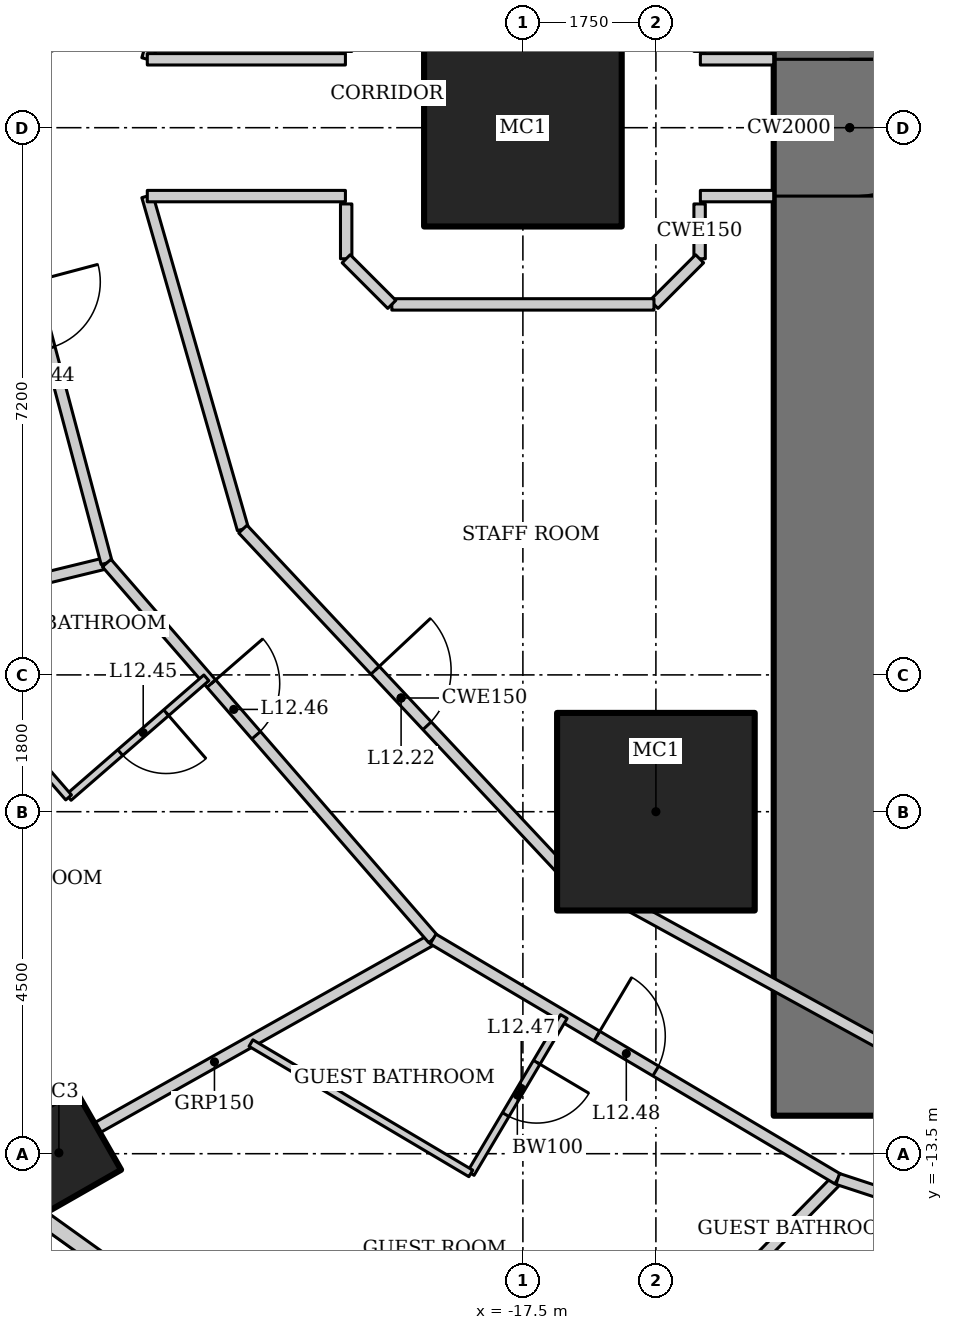
"""IFC4 building model, lengths in metres.
Left out: names, types, materials, properties, quantities, classifications, styles, units other than length and angle.
Written with IfcOpenShell. Run it as: python <this file> out.ifc"""

import sys

from ifc_helpers import new_model, si_unit, direction, frame, frame_2d, origin, origin_2d, place, context, subcontext, project, spatial, rectangle, hollow_rectangle, extrude, element, fill, save


model = new_model("IFC4")
c1 = context("Model", 3, precision=1e-05, world=origin(), true_north=direction((0.0, 1.0)))
c2 = subcontext(c1, "Body", "Model", "MODEL_VIEW")
j1 = project(units=[si_unit("LENGTHUNIT", "METRE"), si_unit("PLANEANGLEUNIT", "RADIAN")], contexts=[c1])
p1 = place(None, origin())
s1 = spatial("IfcSite", under=j1, at=p1, CompositionType="ELEMENT")
p2 = place(p1, origin())
s2 = spatial("IfcBuilding", under=s1, at=p2, CompositionType="ELEMENT")
p3 = place(p2, frame((0.0, 0.0, 58.6)))
s3 = spatial("IfcBuildingStorey", under=s2, at=p3, CompositionType="ELEMENT", Elevation=58.6)
for number, where, z_axis, x_axis in (
    (1, (-17.5, 0.0, 0.0), (0.0, 0.0, 1.0), (1.0, 0.0, 0.0)),
    (2, (-15.75, -9.0, 0.0), (0.0, 0.0, 1.0), (1.0, 0.0, 0.0)),
):
    element("IfcColumn", number, at=place(p3, frame(where, z_axis=z_axis, x_axis=x_axis)), inside=s3, PredefinedType="COLUMN", context=c2, shape_type="SweptSolid", body=[
        extrude(hollow_rectangle(XDim=2.6, YDim=2.6, WallThickness=0.13, at=origin_2d()), origin(), (0.0, 0.0, 1.0), 3.6),
    ])
p4 = place(p3, frame((-23.605, -13.489, 0.0), z_axis=(0.0, 0.0, 1.0), x_axis=(0.86824298017, 0.496139221777, 0.0)))
e3 = element("IfcColumn", 3, at=p4, inside=s3, PredefinedType="COLUMN", context=c2, shape_type="SweptSolid", body=[
    extrude(hollow_rectangle(XDim=1.2, YDim=1.2, WallThickness=0.12, at=origin_2d()), origin(), (0.0, 0.0, 1.0), 3.6),
])
p5 = place(p3, frame((-13.2, 13.0, 0.0), z_axis=(0.0, 0.0, 1.0), x_axis=(0.0, -1.0, 0.0)))
e4 = element("IfcWall", 4, at=p5, inside=s3, PredefinedType="SHEAR", context=c2, shape_type="SweptSolid", body=[
    extrude(rectangle(XDim=26.0, YDim=2.0, at=frame_2d((13.0, 0.0))), origin(), (0.0, 0.0, 1.0), 3.6),
])
p6 = place(p5, frame((12.1, 0.0, 0.0)))
e5 = element("IfcOpeningElement", 5, at=p6, cuts=e4, PredefinedType="OPENING", context=c2, shape_type="SweptSolid", body=[
    extrude(rectangle(XDim=1.8, YDim=2.1, at=frame_2d((0.9, 1.05))), frame((0.0, 1.01, 0.0), z_axis=(0.0, -1.0, 0.0), x_axis=(1.0, 0.0, 0.0)), (0.0, 0.0, 1.0), 2.02),
])
p7 = place(p3, frame((-24.482, -13.875, 0.0), z_axis=(0.0, 0.0, 1.0), x_axis=(0.812791321576, -0.582554948112, 0.0)))
e6 = element("IfcWall", 6, at=p7, inside=s3, PredefinedType="SOLIDWALL", context=c2, shape_type="SweptSolid", body=[
    extrude(rectangle(XDim=8.063, YDim=0.2, at=frame_2d((4.032, 0.0))), origin(), (0.0, 0.0, 1.0), 3.45),
])
p8 = place(p7, frame((2.832, 0.0, 0.5)))
e7 = element("IfcOpeningElement", 7, at=p8, cuts=e6, PredefinedType="OPENING", context=c2, shape_type="SweptSolid", body=[
    extrude(rectangle(XDim=2.4, YDim=2.2, at=frame_2d((1.2, 1.1))), frame((0.0, 0.11, 0.0), z_axis=(0.0, -1.0, 0.0), x_axis=(1.0, 0.0, 0.0)), (0.0, 0.0, 1.0), 0.22),
])
p9 = place(p3, frame((-29.222, -7.254, 0.0), z_axis=(0.0, 0.0, 1.0), x_axis=(0.971456980633, 0.237215797913, 0.0)))
e8 = element("IfcWall", 8, at=p9, inside=s3, PredefinedType="PARTITIONING", context=c2, shape_type="SweptSolid", body=[
    extrude(rectangle(XDim=6.429, YDim=0.15, at=frame_2d((3.215, 0.0))), origin(), (0.0, 0.0, 1.0), 2.332),
])
p10 = place(p3, frame((-24.435, -13.909, 0.0), z_axis=(0.0, 0.0, 1.0), x_axis=(0.871747379892, 0.489955616001, 0.0)))
e9 = element("IfcWall", 9, at=p10, inside=s3, PredefinedType="PARTITIONING", context=c2, shape_type="SweptSolid", body=[
    extrude(rectangle(XDim=6.6, YDim=0.15, at=frame_2d((3.3, 0.0))), origin(), (0.0, 0.0, 1.0), 2.693),
])
p11 = place(p3, frame((-17.97, -18.542, 0.0), z_axis=(0.0, 0.0, 1.0), x_axis=(0.699736251994, 0.714401272147, 0.0)))
e10 = element("IfcWall", 10, at=p11, inside=s3, PredefinedType="PARTITIONING", context=c2, shape_type="SweptSolid", body=[
    extrude(rectangle(XDim=6.593, YDim=0.15, at=frame_2d((3.296, 0.0))), origin(), (0.0, 0.0, 1.0), 2.528),
])
p12 = place(p3, frame((-22.976, 5.729, 0.0), z_axis=(0.0, 0.0, 1.0), x_axis=(-0.257083265334, -0.966389256296, 0.0)))
e11 = element("IfcWall", 11, at=p12, inside=s3, PredefinedType="PARTITIONING", context=c2, shape_type="SweptSolid", body=[
    extrude(rectangle(XDim=5.928, YDim=0.15, at=frame_2d((2.964, 0.0))), origin(), (0.0, 0.0, 1.0), 3.45),
])
p13 = place(p12, frame((4.023, 0.0, 0.0)))
e12 = element("IfcOpeningElement", 12, at=p13, cuts=e11, PredefinedType="OPENING", context=c2, shape_type="SweptSolid", body=[
    extrude(rectangle(XDim=0.9, YDim=2.1, at=frame_2d((0.45, 1.05))), frame((0.0, 0.085, 0.0), z_axis=(0.0, -1.0, 0.0), x_axis=(1.0, 0.0, 0.0)), (0.0, 0.0, 1.0), 0.17),
])
p14 = place(p3, frame((-24.5, 0.0, 0.0), z_axis=(0.0, 0.0, 1.0), x_axis=(0.257083265334, -0.966389256296, 0.0)))
e13 = element("IfcWall", 13, at=p14, inside=s3, PredefinedType="PARTITIONING", context=c2, shape_type="SweptSolid", body=[
    extrude(rectangle(XDim=5.928, YDim=0.15, at=frame_2d((2.964, 0.0))), origin(), (0.0, 0.0, 1.0), 3.45),
])
p15 = place(p14, frame((2.1, 0.0, 0.0)))
e14 = element("IfcOpeningElement", 14, at=p15, cuts=e13, PredefinedType="OPENING", context=c2, shape_type="SweptSolid", body=[
    extrude(rectangle(XDim=0.9, YDim=2.1, at=frame_2d((0.45, 1.05))), frame((0.0, 0.085, 0.0), z_axis=(0.0, -1.0, 0.0), x_axis=(1.0, 0.0, 0.0)), (0.0, 0.0, 1.0), 0.17),
])
p16 = place(p3, frame((-22.976, -5.729, 0.0), z_axis=(0.0, 0.0, 1.0), x_axis=(0.655599989166, -0.755108372491, 0.0)))
e15 = element("IfcWall", 15, at=p16, inside=s3, PredefinedType="PARTITIONING", context=c2, shape_type="SweptSolid", body=[
    extrude(rectangle(XDim=6.551, YDim=0.15, at=frame_2d((3.275, 0.0))), origin(), (0.0, 0.0, 1.0), 3.45),
])
p17 = place(p16, frame((2.1, 0.0, 0.0)))
e16 = element("IfcOpeningElement", 16, at=p17, cuts=e15, PredefinedType="OPENING", context=c2, shape_type="SweptSolid", body=[
    extrude(rectangle(XDim=0.9, YDim=2.1, at=frame_2d((0.45, 1.05))), frame((0.0, 0.085, 0.0), z_axis=(0.0, -1.0, 0.0), x_axis=(1.0, 0.0, 0.0)), (0.0, 0.0, 1.0), 0.17),
])
p18 = place(p3, frame((-18.681, -10.675, 0.0), z_axis=(0.0, 0.0, 1.0), x_axis=(0.860147339762, -0.510045639036, 0.0)))
e17 = element("IfcWall", 17, at=p18, inside=s3, PredefinedType="PARTITIONING", context=c2, shape_type="SweptSolid", body=[
    extrude(rectangle(XDim=6.19, YDim=0.15, at=frame_2d((3.095, 0.0))), origin(), (0.0, 0.0, 1.0), 3.45),
])
p19 = place(p18, frame((2.505, 0.0, 0.0)))
e18 = element("IfcOpeningElement", 18, at=p19, cuts=e17, PredefinedType="OPENING", context=c2, shape_type="SweptSolid", body=[
    extrude(rectangle(XDim=0.9, YDim=2.1, at=frame_2d((0.45, 1.05))), frame((0.0, 0.085, 0.0), z_axis=(0.0, -1.0, 0.0), x_axis=(1.0, 0.0, 0.0)), (0.0, 0.0, 1.0), 0.17),
])
p20 = place(p3, frame((-13.357, -13.832, 0.0), z_axis=(0.0, 0.0, 1.0), x_axis=(0.950106803111, -0.311924770869, 0.0)))
e19 = element("IfcWall", 19, at=p20, inside=s3, PredefinedType="PARTITIONING", context=c2, shape_type="SweptSolid", body=[
    extrude(rectangle(XDim=5.689, YDim=0.15, at=frame_2d((2.845, 0.0))), origin(), (0.0, 0.0, 1.0), 3.45),
])
p21 = place(p20, frame((4.639, 0.0, 0.0)))
e20 = element("IfcOpeningElement", 20, at=p21, cuts=e19, PredefinedType="OPENING", context=c2, shape_type="SweptSolid", body=[
    extrude(rectangle(XDim=0.9, YDim=2.1, at=frame_2d((0.45, 1.05))), frame((0.0, 0.085, 0.0), z_axis=(0.0, -1.0, 0.0), x_axis=(1.0, 0.0, 0.0)), (0.0, 0.0, 1.0), 0.17),
])
for number, where, z_axis, x_axis in (
    (21, (-21.184, 5.282, 0.0), (0.0, 0.0, 1.0), (-0.276, -0.961, 0.0)),
    (22, (-22.442, -0.9, 0.0), (0.0, 0.0, 1.0), (0.276, -0.961, 0.0)),
):
    element("IfcWall", number, at=place(p3, frame(where, z_axis=z_axis, x_axis=x_axis)), inside=s3, PredefinedType="PARTITIONING", context=c2, shape_type="SweptSolid", body=[
        extrude(rectangle(XDim=4.559, YDim=0.15, at=frame_2d((2.279, 0.0))), origin(), (0.0, 0.0, 1.0), 3.45),
    ])
p22 = place(p3, frame((-21.184, -5.282, 0.0), z_axis=(0.0, 0.0, 1.0), x_axis=(0.68365836236, -0.729802194828, 0.0)))
e23 = element("IfcWall", 23, at=p22, inside=s3, PredefinedType="PARTITIONING", context=c2, shape_type="SweptSolid", body=[
    extrude(rectangle(XDim=6.09, YDim=0.15, at=frame_2d((3.045, 0.0))), origin(), (0.0, 0.0, 1.0), 3.45),
])
p23 = place(p22, frame((2.545, 0.0, 0.0)))
e24 = element("IfcOpeningElement", 24, at=p23, cuts=e23, PredefinedType="OPENING", context=c2, shape_type="SweptSolid", body=[
    extrude(rectangle(XDim=1.0, YDim=2.1, at=frame_2d((0.5, 1.05))), frame((0.0, 0.085, 0.0), z_axis=(0.0, -1.0, 0.0), x_axis=(1.0, 0.0, 0.0)), (0.0, 0.0, 1.0), 0.17),
])
p24 = place(p3, frame((-17.021, -9.726, 0.0), z_axis=(0.0, 0.0, 1.0), x_axis=(0.876522084062, -0.481361647986, 0.0)))
e25 = element("IfcWall", 25, at=p24, inside=s3, PredefinedType="PARTITIONING", context=c2, shape_type="SweptSolid", body=[
    extrude(rectangle(XDim=5.687, YDim=0.15, at=frame_2d((2.844, 0.0))), origin(), (0.0, 0.0, 1.0), 3.45),
])
p25 = place(p3, frame((-21.665, -7.239, 0.0), z_axis=(0.0, 0.0, 1.0), x_axis=(-0.755098052661, -0.655611875172, 0.0)))
e26 = element("IfcWall", 26, at=p25, inside=s3, PredefinedType="PARTITIONING", context=c2, shape_type="SweptSolid", body=[
    extrude(rectangle(XDim=2.4, YDim=0.1, at=frame_2d((1.2, 0.0))), origin(), (0.0, 0.0, 1.0), 3.45),
])
p26 = place(p25, frame((0.7, 0.0, 0.0)))
e27 = element("IfcOpeningElement", 27, at=p26, cuts=e26, PredefinedType="OPENING", context=c2, shape_type="SweptSolid", body=[
    extrude(rectangle(XDim=0.8, YDim=2.1, at=frame_2d((0.4, 1.05))), frame((0.0, 0.06, 0.0), z_axis=(0.0, -1.0, 0.0), x_axis=(1.0, 0.0, 0.0)), (0.0, 0.0, 1.0), 0.12),
])
p27 = place(p3, frame((-23.477, -8.812, 0.0), z_axis=(0.0, 0.0, 1.0), x_axis=(-0.655596826012, 0.755111118792, 0.0)))
e28 = element("IfcWall", 28, at=p27, inside=s3, PredefinedType="PARTITIONING", context=c2, shape_type="SweptSolid", body=[
    extrude(rectangle(XDim=3.221, YDim=0.1, at=frame_2d((1.611, 0.0))), origin(), (0.0, 0.0, 1.0), 3.45),
])
p28 = place(p3, frame((-16.961, -11.695, 0.0), z_axis=(0.0, 0.0, 1.0), x_axis=(-0.510075642074, -0.860129548012, 0.0)))
e29 = element("IfcWall", 29, at=p28, inside=s3, PredefinedType="PARTITIONING", context=c2, shape_type="SweptSolid", body=[
    extrude(rectangle(XDim=2.4, YDim=0.1, at=frame_2d((1.2, 0.0))), origin(), (0.0, 0.0, 1.0), 3.45),
])
p29 = place(p28, frame((0.7, 0.0, 0.0)))
e30 = element("IfcOpeningElement", 30, at=p29, cuts=e29, PredefinedType="OPENING", context=c2, shape_type="SweptSolid", body=[
    extrude(rectangle(XDim=0.8, YDim=2.1, at=frame_2d((0.4, 1.05))), frame((0.0, 0.06, 0.0), z_axis=(0.0, -1.0, 0.0), x_axis=(1.0, 0.0, 0.0)), (0.0, 0.0, 1.0), 0.12),
])
p30 = place(p3, frame((-18.185, -13.76, 0.0), z_axis=(0.0, 0.0, 1.0), x_axis=(-0.860146437071, 0.510047161343, 0.0)))
e31 = element("IfcWall", 31, at=p30, inside=s3, PredefinedType="PARTITIONING", context=c2, shape_type="SweptSolid", body=[
    extrude(rectangle(XDim=3.363, YDim=0.1, at=frame_2d((1.681, 0.0))), origin(), (0.0, 0.0, 1.0), 3.45),
])
p31 = place(p3, frame((-14.2, -0.9, 0.0), z_axis=(0.0, 0.0, 1.0), x_axis=(-1.0, 0.0, 0.0)))
e32 = element("IfcWall", 32, at=p31, inside=s3, PredefinedType="PARTITIONING", context=c2, shape_type="SweptSolid", body=[
    extrude(rectangle(XDim=0.965, YDim=0.15, at=frame_2d((0.482, 0.0))), origin(), (0.0, 0.0, 1.0), 3.45),
])
p32 = place(p3, frame((-19.835, -0.9, 0.0), z_axis=(0.0, 0.0, 1.0), x_axis=(-1.0, 0.0, 0.0)))
e33 = element("IfcWall", 33, at=p32, inside=s3, PredefinedType="PARTITIONING", context=c2, shape_type="SweptSolid", body=[
    extrude(rectangle(XDim=2.607, YDim=0.15, at=frame_2d((1.303, 0.0))), origin(), (0.0, 0.0, 1.0), 3.45),
])
p33 = place(p3, frame((-14.2, 0.9, 0.0), z_axis=(0.0, 0.0, 1.0), x_axis=(-1.0, 0.0, 0.0)))
e34 = element("IfcWall", 34, at=p33, inside=s3, PredefinedType="PARTITIONING", context=c2, shape_type="SweptSolid", body=[
    extrude(rectangle(XDim=0.965, YDim=0.15, at=frame_2d((0.482, 0.0))), origin(), (0.0, 0.0, 1.0), 3.45),
])
p34 = place(p3, frame((-19.835, 0.9, 0.0), z_axis=(0.0, 0.0, 1.0), x_axis=(-1.0, 0.0, 0.0)))
e35 = element("IfcWall", 35, at=p34, inside=s3, PredefinedType="PARTITIONING", context=c2, shape_type="SweptSolid", body=[
    extrude(rectangle(XDim=2.607, YDim=0.15, at=frame_2d((1.303, 0.0))), origin(), (0.0, 0.0, 1.0), 3.45),
])
for number, where, z_axis, x_axis in (
    (36, (-19.825, -1.725, 0.0), (0.0, 0.0, 1.0), (0.0, 1.0, 0.0)),
    (37, (-15.175, -1.003, 0.0), (0.0, 0.0, 1.0), (0.0, -1.0, 0.0)),
):
    element("IfcWall", number, at=place(p3, frame(where, z_axis=z_axis, x_axis=x_axis)), inside=s3, PredefinedType="PARTITIONING", context=c2, shape_type="SweptSolid", body=[
        extrude(rectangle(XDim=0.721, YDim=0.15, at=frame_2d((0.361, 0.0))), origin(), (0.0, 0.0, 1.0), 3.45),
    ])
p35 = place(p3, frame((-15.175, -1.725, 0.0), z_axis=(0.0, 0.0, 1.0), x_axis=(-0.707106781187, -0.707106781187, 0.0)))
e38 = element("IfcWall", 38, at=p35, inside=s3, PredefinedType="PARTITIONING", context=c2, shape_type="SweptSolid", body=[
    extrude(rectangle(XDim=0.849, YDim=0.15, at=frame_2d((0.425, 0.0))), origin(), (0.0, 0.0, 1.0), 3.45),
])
p36 = place(p3, frame((-15.775, -2.325, 0.0), z_axis=(0.0, 0.0, 1.0), x_axis=(-1.0, 0.0, 0.0)))
e39 = element("IfcWall", 39, at=p36, inside=s3, PredefinedType="PARTITIONING", context=c2, shape_type="SweptSolid", body=[
    extrude(rectangle(XDim=3.449, YDim=0.15, at=frame_2d((1.725, 0.0))), origin(), (0.0, 0.0, 1.0), 3.45),
])
p37 = place(p3, frame((-19.225, -2.325, 0.0), z_axis=(0.0, 0.0, 1.0), x_axis=(-0.707106781187, 0.707106781187, 0.0)))
e40 = element("IfcWall", 40, at=p37, inside=s3, PredefinedType="PARTITIONING", context=c2, shape_type="SweptSolid", body=[
    extrude(rectangle(XDim=0.849, YDim=0.15, at=frame_2d((0.425, 0.0))), origin(), (0.0, 0.0, 1.0), 3.45),
])
p38 = place(p6, origin())
e41 = element("IfcDoor", 41, at=p38, inside=s3, OperationType="DOUBLE_DOOR_DOUBLE_SWING", PredefinedType="DOOR", context=c2, shape_type="SweptSolid", body=[
    extrude(rectangle(XDim=1.8, YDim=2.1, at=frame_2d((0.9, 1.05))), frame((0.0, 0.025, 0.0), z_axis=(0.0, -1.0, 0.0), x_axis=(1.0, 0.0, 0.0)), (0.0, 0.0, 1.0), 0.05),
])
fill(e5, e41)
p39 = place(p23, origin())
e42 = element("IfcDoor", 42, at=p39, inside=s3, OperationType="SINGLE_SWING_LEFT", PredefinedType="DOOR", context=c2, shape_type="SweptSolid", body=[
    extrude(rectangle(XDim=1.0, YDim=2.1, at=frame_2d((0.5, 1.05))), frame((0.0, 0.025, 0.0), z_axis=(0.0, -1.0, 0.0), x_axis=(1.0, 0.0, 0.0)), (0.0, 0.0, 1.0), 0.05),
])
fill(e24, e42)
p40 = place(p26, origin())
e43 = element("IfcDoor", 43, at=p40, inside=s3, OperationType="SINGLE_SWING_LEFT", PredefinedType="DOOR", context=c2, shape_type="SweptSolid", body=[
    extrude(rectangle(XDim=0.8, YDim=2.1, at=frame_2d((0.4, 1.05))), frame((0.0, 0.025, 0.0), z_axis=(0.0, -1.0, 0.0), x_axis=(1.0, 0.0, 0.0)), (0.0, 0.0, 1.0), 0.05),
])
fill(e27, e43)
p41 = place(p17, origin())
e44 = element("IfcDoor", 44, at=p41, inside=s3, OperationType="SINGLE_SWING_LEFT", PredefinedType="DOOR", context=c2, shape_type="SweptSolid", body=[
    extrude(rectangle(XDim=0.9, YDim=2.1, at=frame_2d((0.45, 1.05))), frame((0.0, 0.025, 0.0), z_axis=(0.0, -1.0, 0.0), x_axis=(1.0, 0.0, 0.0)), (0.0, 0.0, 1.0), 0.05),
])
fill(e16, e44)
p42 = place(p29, origin())
e45 = element("IfcDoor", 45, at=p42, inside=s3, OperationType="SINGLE_SWING_LEFT", PredefinedType="DOOR", context=c2, shape_type="SweptSolid", body=[
    extrude(rectangle(XDim=0.8, YDim=2.1, at=frame_2d((0.4, 1.05))), frame((0.0, 0.025, 0.0), z_axis=(0.0, -1.0, 0.0), x_axis=(1.0, 0.0, 0.0)), (0.0, 0.0, 1.0), 0.05),
])
fill(e30, e45)
p43 = place(p19, origin())
e46 = element("IfcDoor", 46, at=p43, inside=s3, OperationType="SINGLE_SWING_LEFT", PredefinedType="DOOR", context=c2, shape_type="SweptSolid", body=[
    extrude(rectangle(XDim=0.9, YDim=2.1, at=frame_2d((0.45, 1.05))), frame((0.0, 0.025, 0.0), z_axis=(0.0, -1.0, 0.0), x_axis=(1.0, 0.0, 0.0)), (0.0, 0.0, 1.0), 0.05),
])
fill(e18, e46)
save(model, sys.argv[1])
